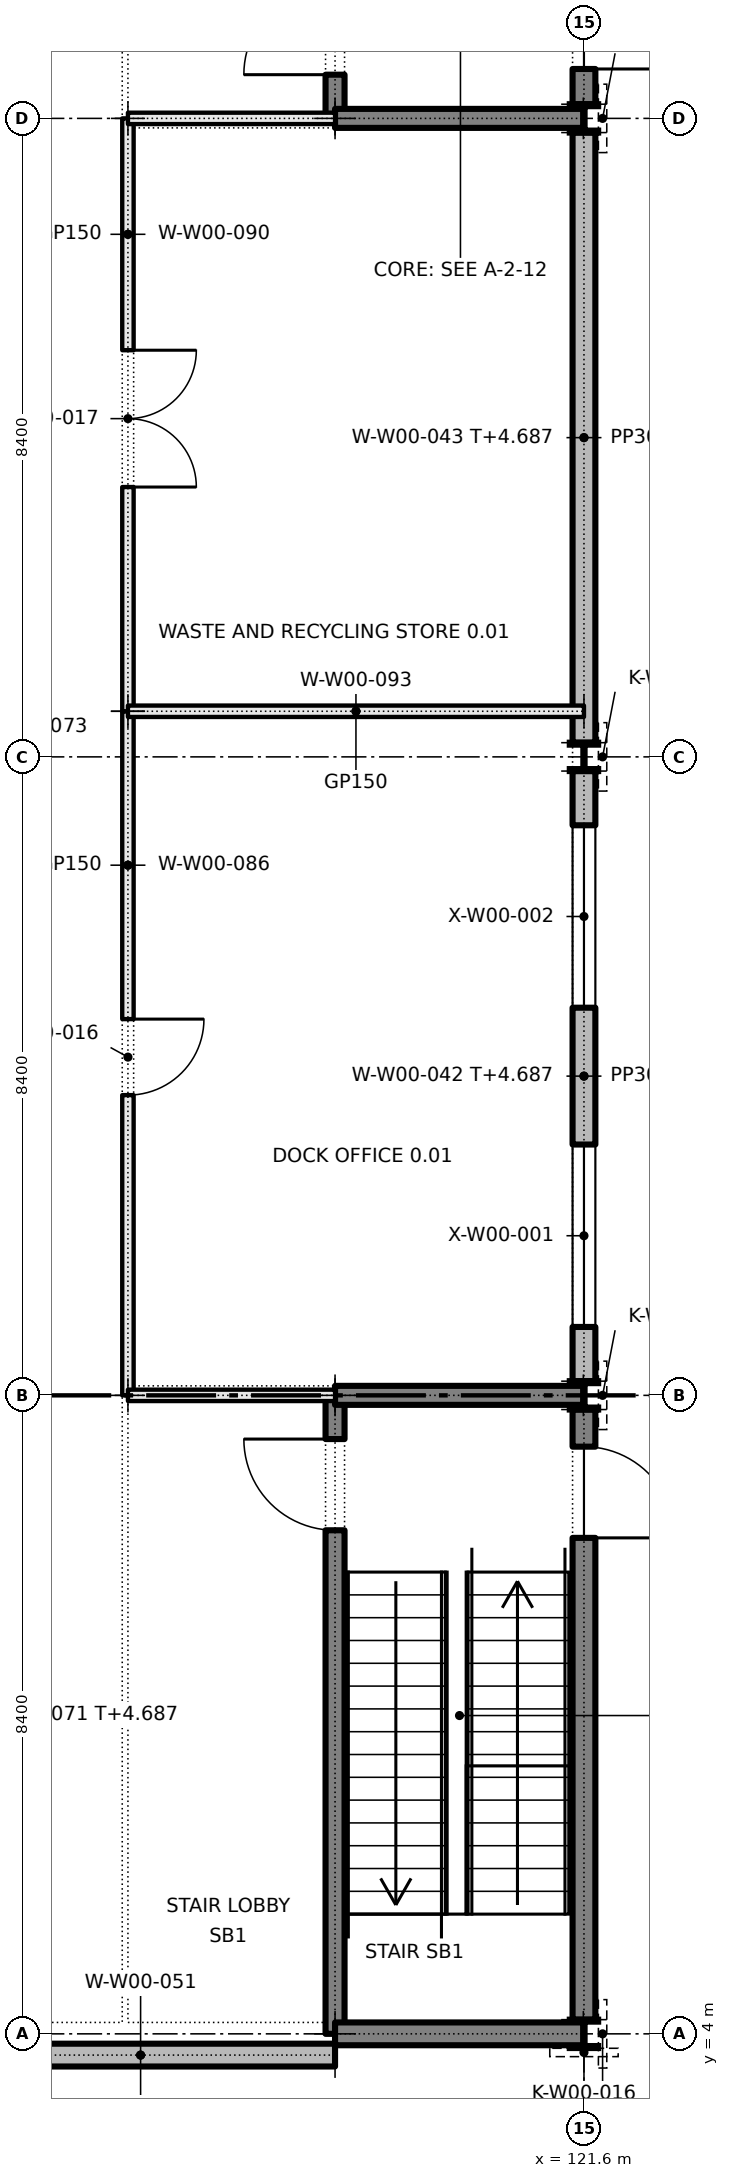
"""IFC4 building model, lengths in metres.
Left out: names, types, materials, properties, quantities, classifications, styles, units other than length and angle.
Written with IfcOpenShell. Run it as: python <this file> out.ifc"""

import sys

from ifc_helpers import new_model, si_unit, direction, frame, frame_2d, origin, origin_2d, place, context, subcontext, project, spatial, rectangle, i_section, extrude, element, fill, save


model = new_model("IFC4")
c1 = context("Model", 3, precision=1e-05, world=origin(), true_north=direction((0.0, 1.0)))
c2 = subcontext(c1, "Body", "Model", "MODEL_VIEW")
j1 = project(units=[si_unit("LENGTHUNIT", "METRE"), si_unit("PLANEANGLEUNIT", "RADIAN")], contexts=[c1])
p1 = place(None, origin())
s1 = spatial("IfcSite", under=j1, at=p1, CompositionType="ELEMENT")
p2 = place(p1, origin())
s2 = spatial("IfcBuilding", under=s1, at=p2, CompositionType="ELEMENT")
p3 = place(p2, origin())
s3 = spatial("IfcBuildingStorey", under=s2, at=p3, CompositionType="ELEMENT", Elevation=0.0)
for number, where, z_axis, x_axis in (
    (1, (121.6, 4.0, 0.0), (0.0, 0.0, 1.0), (1.0, 0.0, 0.0)),
    (2, (121.6, 12.4, 0.0), (0.0, 0.0, 1.0), (1.0, 0.0, 0.0)),
    (3, (121.6, 20.8, 0.0), (0.0, 0.0, 1.0), (1.0, 0.0, 0.0)),
    (4, (121.6, 29.2, 0.0), (0.0, 0.0, 1.0), (1.0, 0.0, 0.0)),
):
    element("IfcColumn", number, at=place(p3, frame(where, z_axis=z_axis, x_axis=x_axis)), inside=s3, PredefinedType="COLUMN", context=c2, shape_type="SweptSolid", body=[
        extrude(i_section(OverallWidth=0.373, OverallDepth=0.373, WebThickness=0.016, FlangeThickness=0.026, FilletRadius=0.015, at=origin_2d()), origin(), (0.0, 0.0, 1.0), 5.4),
    ])
p4 = place(p3, frame((118.325, 4.0, 0.0), z_axis=(0.0, 0.0, 1.0), x_axis=(0.0, 1.0, 0.0)))
e5 = element("IfcWall", 5, at=p4, inside=s3, PredefinedType="SHEAR", context=c2, shape_type="SweptSolid", body=[
    extrude(rectangle(XDim=8.4, YDim=0.25, at=frame_2d((4.2, 0.0))), origin(), (0.0, 0.0, 1.0), 5.4),
])
p5 = place(p4, frame((6.625, 0.0, 0.0)))
e6 = element("IfcOpeningElement", 6, at=p5, cuts=e5, PredefinedType="OPENING", context=c2, shape_type="SweptSolid", body=[
    extrude(rectangle(XDim=1.2, YDim=2.1, at=frame_2d((0.6, 1.05))), frame((0.0, 0.135, 0.0), z_axis=(0.0, -1.0, 0.0), x_axis=(1.0, 0.0, 0.0)), (0.0, 0.0, 1.0), 0.27),
])
p6 = place(p3, frame((118.325, 29.2, 0.0), z_axis=(0.0, 0.0, 1.0), x_axis=(0.0, 1.0, 0.0)))
e7 = element("IfcWall", 7, at=p6, inside=s3, PredefinedType="SHEAR", context=c2, shape_type="SweptSolid", body=[
    extrude(rectangle(XDim=8.4, YDim=0.25, at=frame_2d((4.2, 0.0))), origin(), (0.0, 0.0, 1.0), 5.4),
])
p7 = place(p6, frame((0.575, 0.0, 0.0)))
e8 = element("IfcOpeningElement", 8, at=p7, cuts=e7, PredefinedType="OPENING", context=c2, shape_type="SweptSolid", body=[
    extrude(rectangle(XDim=1.2, YDim=2.1, at=frame_2d((0.6, 1.05))), frame((0.0, 0.135, 0.0), z_axis=(0.0, -1.0, 0.0), x_axis=(1.0, 0.0, 0.0)), (0.0, 0.0, 1.0), 0.27),
])
p8 = place(p3, frame((121.6, 4.187, 0.0), z_axis=(0.0, 0.0, 1.0), x_axis=(0.0, 1.0, 0.0)))
e9 = element("IfcWall", 9, at=p8, inside=s3, PredefinedType="SHEAR", context=c2, shape_type="SweptSolid", body=[
    extrude(rectangle(XDim=8.027, YDim=0.3, at=frame_2d((4.013, 0.0))), origin(), (0.0, 0.0, 1.0), 5.4),
])
p9 = place(p8, frame((6.338, 0.0, 0.0)))
e10 = element("IfcOpeningElement", 10, at=p9, cuts=e9, PredefinedType="OPENING", context=c2, shape_type="SweptSolid", body=[
    extrude(rectangle(XDim=1.2, YDim=2.1, at=frame_2d((0.6, 1.05))), frame((0.0, 0.16, 0.0), z_axis=(0.0, -1.0, 0.0), x_axis=(1.0, 0.0, 0.0)), (0.0, 0.0, 1.0), 0.32),
])
p10 = place(p3, frame((121.6, 29.387, 0.0), z_axis=(0.0, 0.0, 1.0), x_axis=(0.0, 1.0, 0.0)))
e11 = element("IfcWall", 11, at=p10, inside=s3, PredefinedType="SHEAR", context=c2, shape_type="SweptSolid", body=[
    extrude(rectangle(XDim=8.027, YDim=0.3, at=frame_2d((4.013, 0.0))), origin(), (0.0, 0.0, 1.0), 5.4),
])
p11 = place(p10, frame((0.463, 0.0, 0.0)))
e12 = element("IfcOpeningElement", 12, at=p11, cuts=e11, PredefinedType="OPENING", context=c2, shape_type="SweptSolid", body=[
    extrude(rectangle(XDim=1.2, YDim=2.1, at=frame_2d((0.6, 1.05))), frame((0.0, 0.16, 0.0), z_axis=(0.0, -1.0, 0.0), x_axis=(1.0, 0.0, 0.0)), (0.0, 0.0, 1.0), 0.32),
])
p12 = place(p3, frame((118.325, 4.0, 0.0), z_axis=(0.0, 0.0, 1.0), x_axis=(1.0, 0.0, 0.0)))
e13 = element("IfcWall", 13, at=p12, inside=s3, PredefinedType="SHEAR", context=c2, shape_type="SweptSolid", body=[
    extrude(rectangle(XDim=3.267, YDim=0.3, at=frame_2d((1.633, 0.0))), origin(), (0.0, 0.0, 1.0), 5.4),
])
for number, where, z_axis, x_axis in (
    (14, (118.325, 12.4, 0.0), (0.0, 0.0, 1.0), (1.0, 0.0, 0.0)),
    (15, (118.325, 29.2, 0.0), (0.0, 0.0, 1.0), (1.0, 0.0, 0.0)),
):
    element("IfcWall", number, at=place(p3, frame(where, z_axis=z_axis, x_axis=x_axis)), inside=s3, PredefinedType="SHEAR", context=c2, shape_type="SweptSolid", body=[
        extrude(rectangle(XDim=3.267, YDim=0.25, at=frame_2d((1.633, 0.0))), origin(), (0.0, 0.0, 1.0), 5.4),
    ])
for number, where, z_axis, x_axis in (
    (16, (121.6, 4.187, -0.25), (0.0, 0.0, 1.0), (0.0, 1.0, 0.0)),
    (17, (121.6, 11.58, -0.25), (0.0, 0.0, 1.0), (0.0, 1.0, 0.0)),
):
    element("IfcWall", number, at=place(p3, frame(where, z_axis=z_axis, x_axis=x_axis)), inside=s3, PredefinedType="SOLIDWALL", context=c2, shape_type="SweptSolid", body=[
        extrude(rectangle(XDim=0.633, YDim=0.3, at=frame_2d((0.317, 0.0))), origin(), (0.0, 0.0, 1.0), 0.25),
    ])
p13 = place(p3, frame((121.6, 4.82, -0.25), z_axis=(0.0, 0.0, 1.0), x_axis=(0.0, 1.0, 0.0)))
e18 = element("IfcWall", 18, at=p13, inside=s3, PredefinedType="SOLIDWALL", context=c2, shape_type="SweptSolid", body=[
    extrude(rectangle(XDim=6.76, YDim=0.3, at=frame_2d((3.38, 0.0))), origin(), (0.0, 0.0, 1.0), 0.25),
])
p14 = place(p3, frame((121.6, 29.387, -0.25), z_axis=(0.0, 0.0, 1.0), x_axis=(0.0, 1.0, 0.0)))
e19 = element("IfcWall", 19, at=p14, inside=s3, PredefinedType="SOLIDWALL", context=c2, shape_type="SweptSolid", body=[
    extrude(rectangle(XDim=0.633, YDim=0.3, at=frame_2d((0.317, 0.0))), origin(), (0.0, 0.0, 1.0), 0.25),
])
p15 = place(p3, frame((121.6, 30.02, -0.25), z_axis=(0.0, 0.0, 1.0), x_axis=(0.0, 1.0, 0.0)))
e20 = element("IfcWall", 20, at=p15, inside=s3, PredefinedType="SOLIDWALL", context=c2, shape_type="SweptSolid", body=[
    extrude(rectangle(XDim=6.76, YDim=0.3, at=frame_2d((3.38, 0.0))), origin(), (0.0, 0.0, 1.0), 0.25),
])
p16 = place(p3, frame((120.98, 4.0, -0.25), z_axis=(0.0, 0.0, 1.0), x_axis=(1.0, 0.0, 0.0)))
e21 = element("IfcWall", 21, at=p16, inside=s3, PredefinedType="SOLIDWALL", context=c2, shape_type="SweptSolid", body=[
    extrude(rectangle(XDim=0.612, YDim=0.3, at=frame_2d((0.306, 0.0))), origin(), (0.0, 0.0, 1.0), 0.25),
])
p17 = place(p3, frame((118.345, 4.0, -0.25), z_axis=(0.0, 0.0, 1.0), x_axis=(1.0, 0.0, 0.0)))
e22 = element("IfcWall", 22, at=p17, inside=s3, PredefinedType="SOLIDWALL", context=c2, shape_type="SweptSolid", body=[
    extrude(rectangle(XDim=2.635, YDim=0.3, at=frame_2d((1.317, 0.0))), origin(), (0.0, 0.0, 1.0), 0.25),
])
p18 = place(p3, frame((121.6, 12.587, 0.0), z_axis=(0.0, 0.0, 1.0), x_axis=(0.0, 1.0, 0.0)))
e23 = element("IfcWall", 23, at=p18, inside=s3, PredefinedType="SOLIDWALL", context=c2, shape_type="SweptSolid", body=[
    extrude(rectangle(XDim=8.027, YDim=0.3, at=frame_2d((4.013, 0.0))), origin(), (0.0, 0.0, 1.0), 4.687),
])
p19 = place(p18, frame((0.713, 0.0, 0.95)))
e24 = element("IfcOpeningElement", 24, at=p19, cuts=e23, PredefinedType="OPENING", context=c2, shape_type="SweptSolid", body=[
    extrude(rectangle(XDim=2.4, YDim=1.8, at=frame_2d((1.2, 0.9))), frame((0.0, 0.16, 0.0), z_axis=(0.0, -1.0, 0.0), x_axis=(1.0, 0.0, 0.0)), (0.0, 0.0, 1.0), 0.32),
])
p20 = place(p18, frame((4.913, 0.0, 0.95)))
e25 = element("IfcOpeningElement", 25, at=p20, cuts=e23, PredefinedType="OPENING", context=c2, shape_type="SweptSolid", body=[
    extrude(rectangle(XDim=2.4, YDim=1.8, at=frame_2d((1.2, 0.9))), frame((0.0, 0.16, 0.0), z_axis=(0.0, -1.0, 0.0), x_axis=(1.0, 0.0, 0.0)), (0.0, 0.0, 1.0), 0.32),
])
p21 = place(p3, frame((121.6, 20.987, 0.0), z_axis=(0.0, 0.0, 1.0), x_axis=(0.0, 1.0, 0.0)))
e26 = element("IfcWall", 26, at=p21, inside=s3, PredefinedType="SOLIDWALL", context=c2, shape_type="SweptSolid", body=[
    extrude(rectangle(XDim=8.027, YDim=0.3, at=frame_2d((4.013, 0.0))), origin(), (0.0, 0.0, 1.0), 4.687),
])
p22 = place(p3, frame((113.208, 3.72, 0.0), z_axis=(0.0, 0.0, 1.0), x_axis=(1.0, 0.0, 0.0)))
e27 = element("IfcWall", 27, at=p22, inside=s3, PredefinedType="SOLIDWALL", context=c2, shape_type="SweptSolid", body=[
    extrude(rectangle(XDim=5.117, YDim=0.3, at=frame_2d((2.558, 0.0))), origin(), (0.0, 0.0, 1.0), 5.4),
])
p23 = place(p3, frame((115.6, 12.4, 0.0), z_axis=(0.0, 0.0, 1.0), x_axis=(0.0, 1.0, 0.0)))
e28 = element("IfcWall", 28, at=p23, inside=s3, PredefinedType="PARTITIONING", context=c2, shape_type="SweptSolid", body=[
    extrude(rectangle(XDim=9.0, YDim=0.15, at=frame_2d((4.5, 0.0))), origin(), (0.0, 0.0, 1.0), 5.4),
])
p24 = place(p23, frame((3.95, 0.0, 0.0)))
e29 = element("IfcOpeningElement", 29, at=p24, cuts=e28, PredefinedType="OPENING", context=c2, shape_type="SweptSolid", body=[
    extrude(rectangle(XDim=1.0, YDim=2.1, at=frame_2d((0.5, 1.05))), frame((0.0, 0.085, 0.0), z_axis=(0.0, -1.0, 0.0), x_axis=(1.0, 0.0, 0.0)), (0.0, 0.0, 1.0), 0.17),
])
p25 = place(p3, frame((115.6, 21.4, 0.0), z_axis=(0.0, 0.0, 1.0), x_axis=(0.0, 1.0, 0.0)))
e30 = element("IfcWall", 30, at=p25, inside=s3, PredefinedType="PARTITIONING", context=c2, shape_type="SweptSolid", body=[
    extrude(rectangle(XDim=7.8, YDim=0.15, at=frame_2d((3.9, 0.0))), origin(), (0.0, 0.0, 1.0), 5.4),
])
p26 = place(p25, frame((2.95, 0.0, 0.0)))
e31 = element("IfcOpeningElement", 31, at=p26, cuts=e30, PredefinedType="OPENING", context=c2, shape_type="SweptSolid", body=[
    extrude(rectangle(XDim=1.8, YDim=2.1, at=frame_2d((0.9, 1.05))), frame((0.0, 0.085, 0.0), z_axis=(0.0, -1.0, 0.0), x_axis=(1.0, 0.0, 0.0)), (0.0, 0.0, 1.0), 0.17),
])
p27 = place(p3, frame((115.6, 12.4, 0.0), z_axis=(0.0, 0.0, 1.0), x_axis=(1.0, 0.0, 0.0)))
e32 = element("IfcWall", 32, at=p27, inside=s3, PredefinedType="PARTITIONING", context=c2, shape_type="SweptSolid", body=[
    extrude(rectangle(XDim=2.725, YDim=0.15, at=frame_2d((1.362, 0.0))), origin(), (0.0, 0.0, 1.0), 4.608),
])
p28 = place(p3, frame((115.6, 21.4, 0.0), z_axis=(0.0, 0.0, 1.0), x_axis=(1.0, 0.0, 0.0)))
e33 = element("IfcWall", 33, at=p28, inside=s3, PredefinedType="PARTITIONING", context=c2, shape_type="SweptSolid", body=[
    extrude(rectangle(XDim=6.0, YDim=0.15, at=frame_2d((3.0, 0.0))), origin(), (0.0, 0.0, 1.0), 5.4),
])
p29 = place(p3, frame((115.6, 29.2, 0.0), z_axis=(0.0, 0.0, 1.0), x_axis=(1.0, 0.0, 0.0)))
e34 = element("IfcWall", 34, at=p29, inside=s3, PredefinedType="PARTITIONING", context=c2, shape_type="SweptSolid", body=[
    extrude(rectangle(XDim=2.725, YDim=0.15, at=frame_2d((1.362, 0.0))), origin(), (0.0, 0.0, 1.0), 4.608),
])
p30 = place(p9, frame((1.2, 0.0, 0.0), z_axis=(0.0, 0.0, 1.0), x_axis=(-1.0, 0.0, 0.0)))
e35 = element("IfcDoor", 35, at=p30, inside=s3, OperationType="SINGLE_SWING_RIGHT", PredefinedType="DOOR", context=c2, shape_type="SweptSolid", body=[
    extrude(rectangle(XDim=1.2, YDim=2.1, at=frame_2d((0.6, 1.05))), frame((0.0, 0.025, 0.0), z_axis=(0.0, -1.0, 0.0), x_axis=(1.0, 0.0, 0.0)), (0.0, 0.0, 1.0), 0.05),
])
fill(e10, e35)
p31 = place(p11, frame((1.2, 0.0, 0.0), z_axis=(0.0, 0.0, 1.0), x_axis=(-1.0, 0.0, 0.0)))
e36 = element("IfcDoor", 36, at=p31, inside=s3, OperationType="SINGLE_SWING_RIGHT", PredefinedType="DOOR", context=c2, shape_type="SweptSolid", body=[
    extrude(rectangle(XDim=1.2, YDim=2.1, at=frame_2d((0.6, 1.05))), frame((0.0, 0.025, 0.0), z_axis=(0.0, -1.0, 0.0), x_axis=(1.0, 0.0, 0.0)), (0.0, 0.0, 1.0), 0.05),
])
fill(e12, e36)
p32 = place(p19, origin())
e37 = element("IfcWindow", 37, at=p32, inside=s3, PartitioningType="DOUBLE_PANEL_VERTICAL", PredefinedType="WINDOW", context=c2, shape_type="SweptSolid", body=[
    extrude(rectangle(XDim=2.4, YDim=1.8, at=frame_2d((1.2, 0.9))), frame((0.0, 0.03, 0.0), z_axis=(0.0, -1.0, 0.0), x_axis=(1.0, 0.0, 0.0)), (0.0, 0.0, 1.0), 0.06),
])
fill(e24, e37)
p33 = place(p20, origin())
e38 = element("IfcWindow", 38, at=p33, inside=s3, PartitioningType="DOUBLE_PANEL_VERTICAL", PredefinedType="WINDOW", context=c2, shape_type="SweptSolid", body=[
    extrude(rectangle(XDim=2.4, YDim=1.8, at=frame_2d((1.2, 0.9))), frame((0.0, 0.03, 0.0), z_axis=(0.0, -1.0, 0.0), x_axis=(1.0, 0.0, 0.0)), (0.0, 0.0, 1.0), 0.06),
])
fill(e25, e38)
p34 = place(p5, origin())
e39 = element("IfcDoor", 39, at=p34, inside=s3, OperationType="SINGLE_SWING_RIGHT", PredefinedType="DOOR", context=c2, shape_type="SweptSolid", body=[
    extrude(rectangle(XDim=1.2, YDim=2.1, at=frame_2d((0.6, 1.05))), frame((0.0, 0.025, 0.0), z_axis=(0.0, -1.0, 0.0), x_axis=(1.0, 0.0, 0.0)), (0.0, 0.0, 1.0), 0.05),
])
fill(e6, e39)
p35 = place(p7, origin())
e40 = element("IfcDoor", 40, at=p35, inside=s3, OperationType="SINGLE_SWING_LEFT", PredefinedType="DOOR", context=c2, shape_type="SweptSolid", body=[
    extrude(rectangle(XDim=1.2, YDim=2.1, at=frame_2d((0.6, 1.05))), frame((0.0, 0.025, 0.0), z_axis=(0.0, -1.0, 0.0), x_axis=(1.0, 0.0, 0.0)), (0.0, 0.0, 1.0), 0.05),
])
fill(e8, e40)
p36 = place(p24, frame((1.0, 0.0, 0.0), z_axis=(0.0, 0.0, 1.0), x_axis=(-1.0, 0.0, 0.0)))
e41 = element("IfcDoor", 41, at=p36, inside=s3, OperationType="SINGLE_SWING_LEFT", PredefinedType="DOOR", context=c2, shape_type="SweptSolid", body=[
    extrude(rectangle(XDim=1.0, YDim=2.1, at=frame_2d((0.5, 1.05))), frame((0.0, 0.025, 0.0), z_axis=(0.0, -1.0, 0.0), x_axis=(1.0, 0.0, 0.0)), (0.0, 0.0, 1.0), 0.05),
])
fill(e29, e41)
p37 = place(p26, frame((1.8, 0.0, 0.0), z_axis=(0.0, 0.0, 1.0), x_axis=(-1.0, 0.0, 0.0)))
e42 = element("IfcDoor", 42, at=p37, inside=s3, OperationType="DOUBLE_DOOR_SINGLE_SWING", PredefinedType="DOOR", context=c2, shape_type="SweptSolid", body=[
    extrude(rectangle(XDim=1.8, YDim=2.1, at=frame_2d((0.9, 1.05))), frame((0.0, 0.025, 0.0), z_axis=(0.0, -1.0, 0.0), x_axis=(1.0, 0.0, 0.0)), (0.0, 0.0, 1.0), 0.05),
])
fill(e31, e42)
save(model, sys.argv[1])
